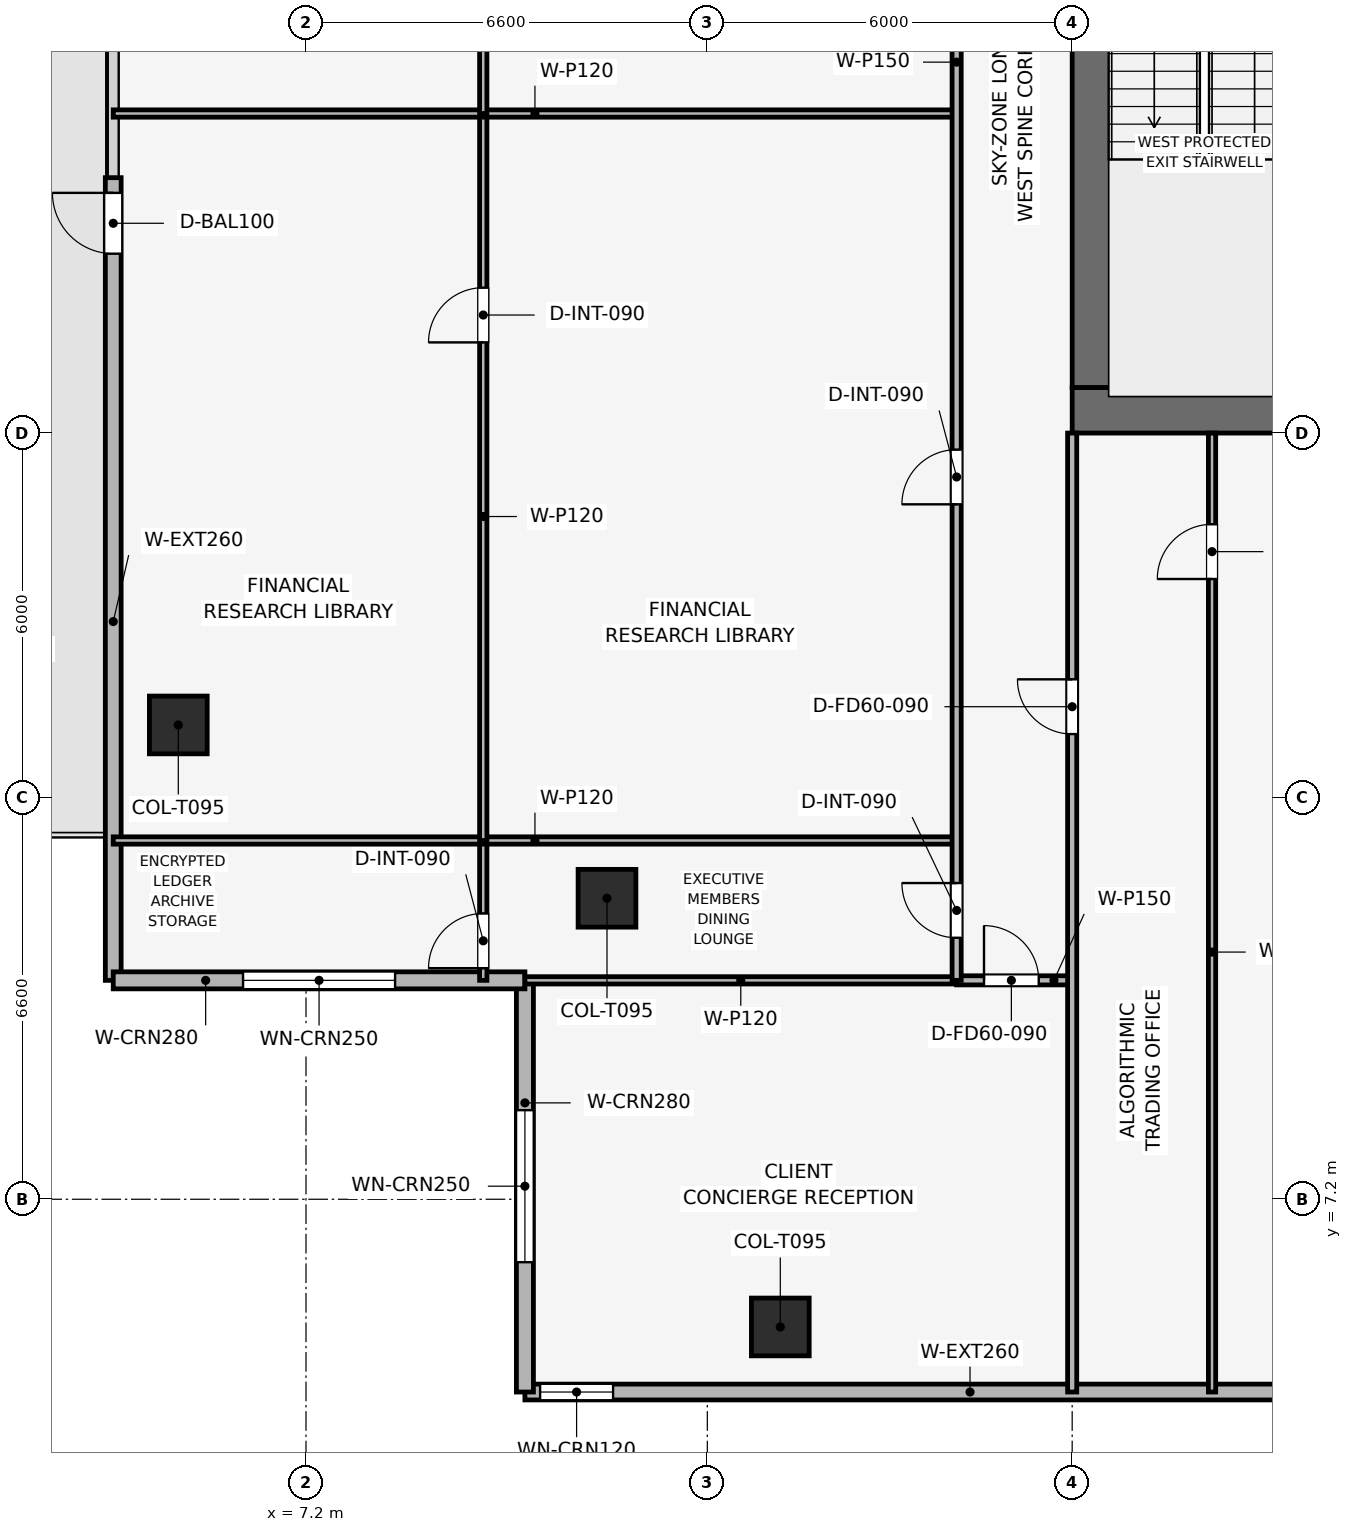
"""IFC4 building model, lengths in metres.
Left out: names, types, materials, properties, quantities, classifications, styles, units other than length and angle.
Written with IfcOpenShell. Run it as: python <this file> out.ifc"""

import sys

from ifc_helpers import new_model, si_unit, direction, frame, frame_2d, origin, origin_2d, place, context, subcontext, project, spatial, rectangle, extrude, element, fill, save


model = new_model("IFC4")
c1 = context("Model", 3, precision=1e-05, world=origin(), true_north=direction((0.0, 1.0)))
c2 = subcontext(c1, "Body", "Model", "MODEL_VIEW")
j1 = project(units=[si_unit("LENGTHUNIT", "METRE"), si_unit("PLANEANGLEUNIT", "RADIAN")], contexts=[c1])
p1 = place(None, origin())
s1 = spatial("IfcSite", under=j1, at=p1, CompositionType="ELEMENT")
p2 = place(p1, origin())
s2 = spatial("IfcBuilding", under=s1, at=p2, CompositionType="ELEMENT")
p3 = place(p2, frame((0.0, 0.0, 269.1)))
s3 = spatial("IfcBuildingStorey", under=s2, at=p3, CompositionType="ELEMENT", Elevation=269.1)
p4 = place(p3, frame((19.8, 20.175, 0.0), z_axis=(0.0, 0.0, 1.0), x_axis=(1.0, 0.0, 0.0)))
e1 = element("IfcWall", 1, at=p4, inside=s3, PredefinedType="SHEAR", context=c2, shape_type="SweptSolid", body=[
    extrude(rectangle(XDim=18.0, YDim=0.75, at=frame_2d((9.0, 0.0))), origin(), (0.0, 0.0, 1.0), 3.75),
])
p5 = place(p3, frame((20.175, 20.55, 0.0), z_axis=(0.0, 0.0, 1.0), x_axis=(0.0, 1.0, 0.0)))
e2 = element("IfcWall", 2, at=p5, inside=s3, PredefinedType="SHEAR", context=c2, shape_type="SweptSolid", body=[
    extrude(rectangle(XDim=16.5, YDim=0.75, at=frame_2d((8.25, 0.0))), origin(), (0.0, 0.0, 1.0), 3.75),
])
p6 = place(p5, frame((10.25, 0.0, 0.0)))
e3 = element("IfcOpeningElement", 3, at=p6, cuts=e2, PredefinedType="OPENING", context=c2, shape_type="SweptSolid", body=[
    extrude(rectangle(XDim=1.1, YDim=2.15, at=frame_2d((0.55, 1.075))), frame((0.0, 0.385, 0.0), z_axis=(0.0, -1.0, 0.0), x_axis=(1.0, 0.0, 0.0)), (0.0, 0.0, 1.0), 0.77),
])
for number, where, z_axis, x_axis in (
    (4, (15.0, 5.1, 0.003), (0.0, 0.0, 1.0), (1.0, 0.0, 0.0)),
    (5, (5.1, 15.0, 0.003), (0.0, 0.0, 1.0), (1.0, 0.0, 0.0)),
    (6, (12.15, 12.15, 0.003), (0.0, 0.0, 1.0), (1.0, 0.0, 0.0)),
):
    element("IfcColumn", number, at=place(p3, frame(where, z_axis=z_axis, x_axis=x_axis)), inside=s3, PredefinedType="COLUMN", context=c2, shape_type="SweptSolid", body=[
        extrude(rectangle(XDim=0.95, YDim=0.95, at=origin_2d()), origin(), (0.0, 0.0, 1.0), 3.494),
    ])
p7 = place(p3, frame((24.0, 4.03, 0.0), z_axis=(0.0, 0.0, 1.0), x_axis=(-1.0, 0.0, 0.0)))
e7 = element("IfcWall", 7, at=p7, inside=s3, PredefinedType="SOLIDWALL", context=c2, shape_type="SweptSolid", body=[
    extrude(rectangle(XDim=13.2, YDim=0.26, at=frame_2d((6.6, 0.0))), origin(), (0.0, 0.0, 1.0), 3.5),
])
p8 = place(p7, frame((11.75, 0.0, 0.9)))
e8 = element("IfcOpeningElement", 8, at=p8, cuts=e7, PredefinedType="OPENING", context=c2, shape_type="SweptSolid", body=[
    extrude(rectangle(XDim=1.2, YDim=2.1, at=frame_2d((0.6, 1.05))), frame((0.0, 0.14, 0.0), z_axis=(0.0, -1.0, 0.0), x_axis=(1.0, 0.0, 0.0)), (0.0, 0.0, 1.0), 0.28),
])
p9 = place(p3, frame((4.03, 10.8, 0.0), z_axis=(0.0, 0.0, 1.0), x_axis=(0.0, 1.0, 0.0)))
e9 = element("IfcWall", 9, at=p9, inside=s3, PredefinedType="SOLIDWALL", context=c2, shape_type="SweptSolid", body=[
    extrude(rectangle(XDim=13.2, YDim=0.26, at=frame_2d((6.6, 0.0))), origin(), (0.0, 0.0, 1.0), 3.5),
])
p10 = place(p9, frame((11.95, 0.0, 0.0)))
e10 = element("IfcOpeningElement", 10, at=p10, cuts=e9, PredefinedType="OPENING", context=c2, shape_type="SweptSolid", body=[
    extrude(rectangle(XDim=1.0, YDim=2.2, at=frame_2d((0.5, 1.1))), frame((0.0, 0.14, 0.0), z_axis=(0.0, -1.0, 0.0), x_axis=(1.0, 0.0, 0.0)), (0.0, 0.0, 1.0), 0.28),
])
p11 = place(p3, frame((10.8, 4.03, 0.0), z_axis=(0.0, 0.0, 1.0), x_axis=(0.0, 1.0, 0.0)))
e11 = element("IfcWall", 11, at=p11, inside=s3, PredefinedType="SOLIDWALL", context=c2, shape_type="SweptSolid", body=[
    extrude(rectangle(XDim=6.77, YDim=0.28, at=frame_2d((3.385, 0.0))), origin(), (0.0, 0.0, 1.0), 3.5),
])
p12 = place(p11, frame((2.135, 0.0, 0.9)))
e12 = element("IfcOpeningElement", 12, at=p12, cuts=e11, PredefinedType="OPENING", context=c2, shape_type="SweptSolid", body=[
    extrude(rectangle(XDim=2.5, YDim=1.9, at=frame_2d((1.25, 0.95))), frame((0.0, 0.15, 0.0), z_axis=(0.0, -1.0, 0.0), x_axis=(1.0, 0.0, 0.0)), (0.0, 0.0, 1.0), 0.3),
])
p13 = place(p3, frame((10.8, 10.8, 0.0), z_axis=(0.0, 0.0, 1.0), x_axis=(-1.0, 0.0, 0.0)))
e13 = element("IfcWall", 13, at=p13, inside=s3, PredefinedType="SOLIDWALL", context=c2, shape_type="SweptSolid", body=[
    extrude(rectangle(XDim=6.77, YDim=0.28, at=frame_2d((3.385, 0.0))), origin(), (0.0, 0.0, 1.0), 3.5),
])
p14 = place(p13, frame((2.135, 0.0, 0.9)))
e14 = element("IfcOpeningElement", 14, at=p14, cuts=e13, PredefinedType="OPENING", context=c2, shape_type="SweptSolid", body=[
    extrude(rectangle(XDim=2.5, YDim=1.9, at=frame_2d((1.25, 0.95))), frame((0.0, 0.15, 0.0), z_axis=(0.0, -1.0, 0.0), x_axis=(1.0, 0.0, 0.0)), (0.0, 0.0, 1.0), 0.3),
])
p15 = place(p3, frame((10.115, 10.8, 0.0), z_axis=(0.0, 0.0, 1.0), x_axis=(0.0, 1.0, 0.0)))
e15 = element("IfcWall", 15, at=p15, inside=s3, PredefinedType="PARTITIONING", context=c2, shape_type="SweptSolid", body=[
    extrude(rectangle(XDim=2.3, YDim=0.12, at=frame_2d((1.15, 0.0))), origin(), (0.0, 0.0, 1.0), 3.085),
])
p16 = place(p15, frame((0.2, 0.0, 0.0)))
e16 = element("IfcOpeningElement", 16, at=p16, cuts=e15, PredefinedType="OPENING", context=c2, shape_type="SweptSolid", body=[
    extrude(rectangle(XDim=0.9, YDim=2.1, at=frame_2d((0.45, 1.05))), frame((0.0, 0.07, 0.0), z_axis=(0.0, -1.0, 0.0), x_axis=(1.0, 0.0, 0.0)), (0.0, 0.0, 1.0), 0.14),
])
p17 = place(p3, frame((4.03, 13.1, 0.0), z_axis=(0.0, 0.0, 1.0), x_axis=(1.0, 0.0, 0.0)))
e17 = element("IfcWall", 17, at=p17, inside=s3, PredefinedType="PARTITIONING", context=c2, shape_type="SweptSolid", body=[
    extrude(rectangle(XDim=13.87, YDim=0.12, at=frame_2d((6.935, 0.0))), origin(), (0.0, 0.0, 1.0), 3.085),
])
p18 = place(p3, frame((10.115, 13.1, 0.0), z_axis=(0.0, 0.0, 1.0), x_axis=(0.0, 1.0, 0.0)))
e18 = element("IfcWall", 18, at=p18, inside=s3, PredefinedType="PARTITIONING", context=c2, shape_type="SweptSolid", body=[
    extrude(rectangle(XDim=11.955, YDim=0.12, at=frame_2d((5.978, 0.0))), origin(), (0.0, 0.0, 1.0), 3.085),
])
p19 = place(p18, frame((8.191, 0.0, 0.0)))
e19 = element("IfcOpeningElement", 19, at=p19, cuts=e18, PredefinedType="OPENING", context=c2, shape_type="SweptSolid", body=[
    extrude(rectangle(XDim=0.9, YDim=2.1, at=frame_2d((0.45, 1.05))), frame((0.0, 0.07, 0.0), z_axis=(0.0, -1.0, 0.0), x_axis=(1.0, 0.0, 0.0)), (0.0, 0.0, 1.0), 0.14),
])
p20 = place(p3, frame((4.03, 25.055, 0.0), z_axis=(0.0, 0.0, 1.0), x_axis=(1.0, 0.0, 0.0)))
e20 = element("IfcWall", 20, at=p20, inside=s3, PredefinedType="PARTITIONING", context=c2, shape_type="SweptSolid", body=[
    extrude(rectangle(XDim=13.87, YDim=0.12, at=frame_2d((6.935, 0.0))), origin(), (0.0, 0.0, 1.0), 3.085),
])
p21 = place(p3, frame((10.115, 25.055, 0.0), z_axis=(0.0, 0.0, 1.0), x_axis=(0.0, 1.0, 0.0)))
e21 = element("IfcWall", 21, at=p21, inside=s3, PredefinedType="PARTITIONING", context=c2, shape_type="SweptSolid", body=[
    extrude(rectangle(XDim=14.645, YDim=0.12, at=frame_2d((7.323, 0.0))), origin(), (0.0, 0.0, 1.0), 3.085),
])
p22 = place(p21, frame((10.209, 0.0, 0.0)))
e22 = element("IfcOpeningElement", 22, at=p22, cuts=e21, PredefinedType="OPENING", context=c2, shape_type="SweptSolid", body=[
    extrude(rectangle(XDim=0.9, YDim=2.1, at=frame_2d((0.45, 1.05))), frame((0.0, 0.07, 0.0), z_axis=(0.0, -1.0, 0.0), x_axis=(1.0, 0.0, 0.0)), (0.0, 0.0, 1.0), 0.14),
])
p23 = place(p3, frame((10.8, 10.8, 0.0), z_axis=(0.0, 0.0, 1.0), x_axis=(1.0, 0.0, 0.0)))
e23 = element("IfcWall", 23, at=p23, inside=s3, PredefinedType="PARTITIONING", context=c2, shape_type="SweptSolid", body=[
    extrude(rectangle(XDim=7.1, YDim=0.12, at=frame_2d((3.55, 0.0))), origin(), (0.0, 0.0, 1.0), 3.085),
])
p24 = place(p3, frame((17.9, 10.8, 0.0), z_axis=(0.0, 0.0, 1.0), x_axis=(1.0, 0.0, 0.0)))
e24 = element("IfcWall", 24, at=p24, inside=s3, PredefinedType="PARTITIONING", context=c2, shape_type="SweptSolid", body=[
    extrude(rectangle(XDim=1.9, YDim=0.15, at=frame_2d((0.95, 0.0))), origin(), (0.0, 0.0, 1.0), 3.5),
])
p25 = place(p24, frame((0.45, 0.0, 0.0)))
e25 = element("IfcOpeningElement", 25, at=p25, cuts=e24, PredefinedType="OPENING", context=c2, shape_type="SweptSolid", body=[
    extrude(rectangle(XDim=0.9, YDim=2.1, at=frame_2d((0.45, 1.05))), frame((0.0, 0.085, 0.0), z_axis=(0.0, -1.0, 0.0), x_axis=(1.0, 0.0, 0.0)), (0.0, 0.0, 1.0), 0.17),
])
p26 = place(p3, frame((19.8, 4.03, 0.0), z_axis=(0.0, 0.0, 1.0), x_axis=(0.0, 1.0, 0.0)))
e26 = element("IfcWall", 26, at=p26, inside=s3, PredefinedType="PARTITIONING", context=c2, shape_type="SweptSolid", body=[
    extrude(rectangle(XDim=15.77, YDim=0.15, at=frame_2d((7.885, 0.0))), origin(), (0.0, 0.0, 1.0), 3.085),
])
p27 = place(p26, frame((10.82, 0.0, 0.0)))
e27 = element("IfcOpeningElement", 27, at=p27, cuts=e26, PredefinedType="OPENING", context=c2, shape_type="SweptSolid", body=[
    extrude(rectangle(XDim=0.9, YDim=2.1, at=frame_2d((0.45, 1.05))), frame((0.0, 0.085, 0.0), z_axis=(0.0, -1.0, 0.0), x_axis=(1.0, 0.0, 0.0)), (0.0, 0.0, 1.0), 0.17),
])
p28 = place(p3, frame((22.1, 4.03, 0.0), z_axis=(0.0, 0.0, 1.0), x_axis=(0.0, 1.0, 0.0)))
e28 = element("IfcWall", 28, at=p28, inside=s3, PredefinedType="PARTITIONING", context=c2, shape_type="SweptSolid", body=[
    extrude(rectangle(XDim=15.77, YDim=0.12, at=frame_2d((7.885, 0.0))), origin(), (0.0, 0.0, 1.0), 3.085),
])
p29 = place(p28, frame((13.37, 0.0, 0.0)))
e29 = element("IfcOpeningElement", 29, at=p29, cuts=e28, PredefinedType="OPENING", context=c2, shape_type="SweptSolid", body=[
    extrude(rectangle(XDim=0.9, YDim=2.1, at=frame_2d((0.45, 1.05))), frame((0.0, 0.07, 0.0), z_axis=(0.0, -1.0, 0.0), x_axis=(1.0, 0.0, 0.0)), (0.0, 0.0, 1.0), 0.14),
])
p30 = place(p3, frame((17.9, 10.8, 0.0), z_axis=(0.0, 0.0, 1.0), x_axis=(0.0, 1.0, 0.0)))
e30 = element("IfcWall", 30, at=p30, inside=s3, PredefinedType="PARTITIONING", context=c2, shape_type="SweptSolid", body=[
    extrude(rectangle(XDim=28.9, YDim=0.15, at=frame_2d((14.45, 0.0))), origin(), (0.0, 0.0, 1.0), 3.085),
])
p31 = place(p30, frame((0.7, 0.0, 0.0)))
e31 = element("IfcOpeningElement", 31, at=p31, cuts=e30, PredefinedType="OPENING", context=c2, shape_type="SweptSolid", body=[
    extrude(rectangle(XDim=0.9, YDim=2.1, at=frame_2d((0.45, 1.05))), frame((0.0, 0.085, 0.0), z_axis=(0.0, -1.0, 0.0), x_axis=(1.0, 0.0, 0.0)), (0.0, 0.0, 1.0), 0.17),
])
p32 = place(p30, frame((7.828, 0.0, 0.0)))
e32 = element("IfcOpeningElement", 32, at=p32, cuts=e30, PredefinedType="OPENING", context=c2, shape_type="SweptSolid", body=[
    extrude(rectangle(XDim=0.9, YDim=2.1, at=frame_2d((0.45, 1.05))), frame((0.0, 0.085, 0.0), z_axis=(0.0, -1.0, 0.0), x_axis=(1.0, 0.0, 0.0)), (0.0, 0.0, 1.0), 0.17),
])
p33 = place(p30, frame((21.127, 0.0, 0.0)))
e33 = element("IfcOpeningElement", 33, at=p33, cuts=e30, PredefinedType="OPENING", context=c2, shape_type="SweptSolid", body=[
    extrude(rectangle(XDim=0.9, YDim=2.1, at=frame_2d((0.45, 1.05))), frame((0.0, 0.085, 0.0), z_axis=(0.0, -1.0, 0.0), x_axis=(1.0, 0.0, 0.0)), (0.0, 0.0, 1.0), 0.17),
])
p34 = place(p8, origin())
e34 = element("IfcWindow", 34, at=p34, inside=s3, PartitioningType="SINGLE_PANEL", PredefinedType="WINDOW", context=c2, shape_type="SweptSolid", body=[
    extrude(rectangle(XDim=1.2, YDim=2.1, at=frame_2d((0.6, 1.05))), frame((0.0, 0.03, 0.0), z_axis=(0.0, -1.0, 0.0), x_axis=(1.0, 0.0, 0.0)), (0.0, 0.0, 1.0), 0.06),
])
fill(e8, e34)
p35 = place(p10, origin())
e35 = element("IfcDoor", 35, at=p35, inside=s3, OperationType="SINGLE_SWING_RIGHT", PredefinedType="DOOR", context=c2, shape_type="SweptSolid", body=[
    extrude(rectangle(XDim=1.0, YDim=2.2, at=frame_2d((0.5, 1.1))), frame((0.0, 0.025, 0.0), z_axis=(0.0, -1.0, 0.0), x_axis=(1.0, 0.0, 0.0)), (0.0, 0.0, 1.0), 0.05),
])
fill(e10, e35)
p36 = place(p12, origin())
e36 = element("IfcWindow", 36, at=p36, inside=s3, PartitioningType="SINGLE_PANEL", PredefinedType="WINDOW", context=c2, shape_type="SweptSolid", body=[
    extrude(rectangle(XDim=2.5, YDim=1.9, at=frame_2d((1.25, 0.95))), frame((0.0, 0.03, 0.0), z_axis=(0.0, -1.0, 0.0), x_axis=(1.0, 0.0, 0.0)), (0.0, 0.0, 1.0), 0.06),
])
fill(e12, e36)
p37 = place(p14, origin())
e37 = element("IfcWindow", 37, at=p37, inside=s3, PartitioningType="SINGLE_PANEL", PredefinedType="WINDOW", context=c2, shape_type="SweptSolid", body=[
    extrude(rectangle(XDim=2.5, YDim=1.9, at=frame_2d((1.25, 0.95))), frame((0.0, 0.03, 0.0), z_axis=(0.0, -1.0, 0.0), x_axis=(1.0, 0.0, 0.0)), (0.0, 0.0, 1.0), 0.06),
])
fill(e14, e37)
p38 = place(p16, origin())
e38 = element("IfcDoor", 38, at=p38, inside=s3, OperationType="SINGLE_SWING_LEFT", PredefinedType="DOOR", context=c2, shape_type="SweptSolid", body=[
    extrude(rectangle(XDim=0.9, YDim=2.1, at=frame_2d((0.45, 1.05))), frame((0.0, 0.025, 0.0), z_axis=(0.0, -1.0, 0.0), x_axis=(1.0, 0.0, 0.0)), (0.0, 0.0, 1.0), 0.05),
])
fill(e16, e38)
p39 = place(p19, origin())
e39 = element("IfcDoor", 39, at=p39, inside=s3, OperationType="SINGLE_SWING_LEFT", PredefinedType="DOOR", context=c2, shape_type="SweptSolid", body=[
    extrude(rectangle(XDim=0.9, YDim=2.1, at=frame_2d((0.45, 1.05))), frame((0.0, 0.025, 0.0), z_axis=(0.0, -1.0, 0.0), x_axis=(1.0, 0.0, 0.0)), (0.0, 0.0, 1.0), 0.05),
])
fill(e19, e39)
p40 = place(p25, origin())
e40 = element("IfcDoor", 40, at=p40, inside=s3, OperationType="SINGLE_SWING_LEFT", PredefinedType="DOOR", context=c2, shape_type="SweptSolid", body=[
    extrude(rectangle(XDim=0.9, YDim=2.1, at=frame_2d((0.45, 1.05))), frame((0.0, 0.025, 0.0), z_axis=(0.0, -1.0, 0.0), x_axis=(1.0, 0.0, 0.0)), (0.0, 0.0, 1.0), 0.05),
])
fill(e25, e40)
p41 = place(p27, origin())
e41 = element("IfcDoor", 41, at=p41, inside=s3, OperationType="SINGLE_SWING_RIGHT", PredefinedType="DOOR", context=c2, shape_type="SweptSolid", body=[
    extrude(rectangle(XDim=0.9, YDim=2.1, at=frame_2d((0.45, 1.05))), frame((0.0, 0.025, 0.0), z_axis=(0.0, -1.0, 0.0), x_axis=(1.0, 0.0, 0.0)), (0.0, 0.0, 1.0), 0.05),
])
fill(e27, e41)
p42 = place(p29, origin())
e42 = element("IfcDoor", 42, at=p42, inside=s3, OperationType="SINGLE_SWING_LEFT", PredefinedType="DOOR", context=c2, shape_type="SweptSolid", body=[
    extrude(rectangle(XDim=0.9, YDim=2.1, at=frame_2d((0.45, 1.05))), frame((0.0, 0.025, 0.0), z_axis=(0.0, -1.0, 0.0), x_axis=(1.0, 0.0, 0.0)), (0.0, 0.0, 1.0), 0.05),
])
fill(e29, e42)
p43 = place(p31, origin())
e43 = element("IfcDoor", 43, at=p43, inside=s3, OperationType="SINGLE_SWING_RIGHT", PredefinedType="DOOR", context=c2, shape_type="SweptSolid", body=[
    extrude(rectangle(XDim=0.9, YDim=2.1, at=frame_2d((0.45, 1.05))), frame((0.0, 0.025, 0.0), z_axis=(0.0, -1.0, 0.0), x_axis=(1.0, 0.0, 0.0)), (0.0, 0.0, 1.0), 0.05),
])
fill(e31, e43)
p44 = place(p32, origin())
e44 = element("IfcDoor", 44, at=p44, inside=s3, OperationType="SINGLE_SWING_LEFT", PredefinedType="DOOR", context=c2, shape_type="SweptSolid", body=[
    extrude(rectangle(XDim=0.9, YDim=2.1, at=frame_2d((0.45, 1.05))), frame((0.0, 0.025, 0.0), z_axis=(0.0, -1.0, 0.0), x_axis=(1.0, 0.0, 0.0)), (0.0, 0.0, 1.0), 0.05),
])
fill(e32, e44)
save(model, sys.argv[1])
